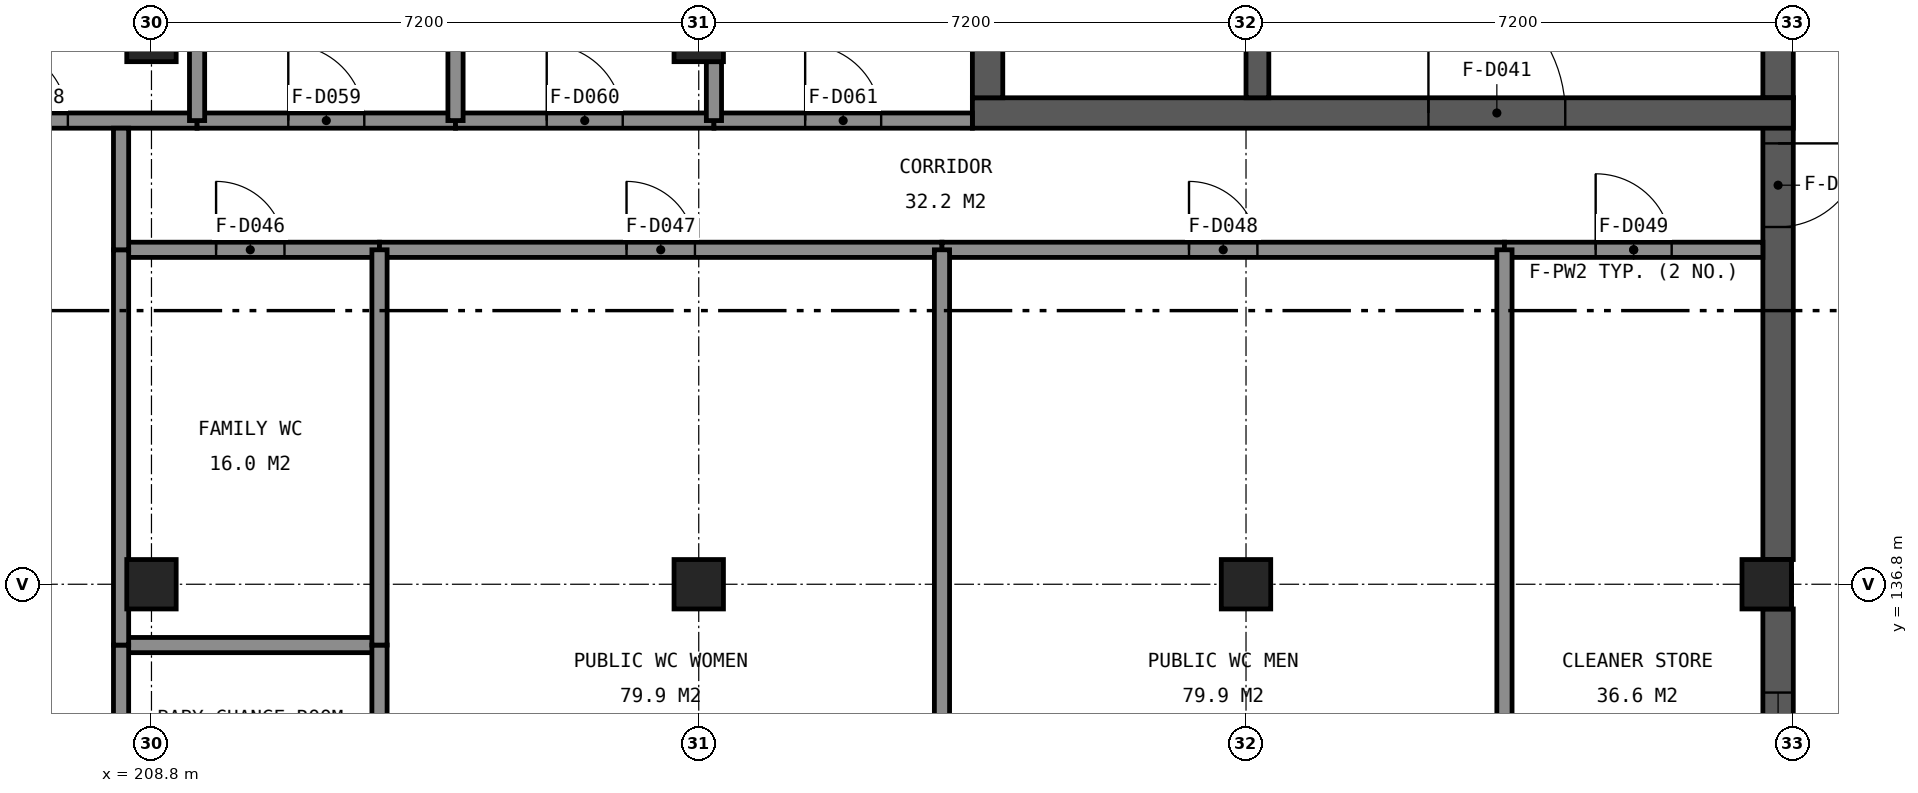
"""IFC4 building model, lengths in metres.
Left out: names, types, materials, properties, quantities, classifications, styles, units other than length and angle.
Written with IfcOpenShell. Run it as: python <this file> out.ifc"""

import sys

from ifc_helpers import new_model, si_unit, direction, frame, frame_2d, origin, origin_2d, place, context, subcontext, project, spatial, rectangle, extrude, element, fill, save


model = new_model("IFC4")
c1 = context("Model", 3, precision=1e-05, world=origin(), true_north=direction((0.0, 1.0)))
c2 = subcontext(c1, "Body", "Model", "MODEL_VIEW")
j1 = project(units=[si_unit("LENGTHUNIT", "METRE"), si_unit("PLANEANGLEUNIT", "RADIAN")], contexts=[c1])
p1 = place(None, origin())
s1 = spatial("IfcSite", under=j1, at=p1, CompositionType="ELEMENT")
p2 = place(p1, origin())
s2 = spatial("IfcBuilding", under=s1, at=p2, CompositionType="ELEMENT")
p3 = place(p2, frame((0.0, 0.0, 4.8)))
s3 = spatial("IfcBuildingStorey", under=s2, at=p3, CompositionType="ELEMENT", Elevation=4.8)
for number, where, z_axis, x_axis in (
    (1, (208.8, 136.8, 0.0), (0.0, 0.0, 1.0), (1.0, 0.0, 0.0)),
    (2, (216.0, 136.8, 0.0), (0.0, 0.0, 1.0), (1.0, 0.0, 0.0)),
    (3, (223.2, 136.8, 0.0), (0.0, 0.0, 1.0), (1.0, 0.0, 0.0)),
    (4, (230.05, 136.8, 0.0), (0.0, 0.0, 1.0), (1.0, 0.0, 0.0)),
    (5, (208.8, 144.0, 0.0), (0.0, 0.0, 1.0), (1.0, 0.0, 0.0)),
    (6, (216.0, 144.0, 0.0), (0.0, 0.0, 1.0), (1.0, 0.0, 0.0)),
):
    element("IfcColumn", number, at=place(p3, frame(where, z_axis=z_axis, x_axis=x_axis)), inside=s3, PredefinedType="COLUMN", context=c2, shape_type="SweptSolid", body=[
        extrude(rectangle(XDim=0.65, YDim=0.65, at=origin_2d()), origin(), (0.0, 0.0, 1.0), 4.8),
    ])
p4 = place(p3, frame((230.2, 136.475, 0.0), z_axis=(0.0, 0.0, 1.0), x_axis=(0.0, -1.0, 0.0)))
e7 = element("IfcWall", 7, at=p4, inside=s3, PredefinedType="SHEAR", context=c2, shape_type="SweptSolid", body=[
    extrude(rectangle(XDim=6.2, YDim=0.4, at=frame_2d((3.1, 0.0))), origin(), (0.0, 0.0, 1.0), 3.95),
])
p5 = place(p4, frame((1.1, 0.0, 1.0)))
e8 = element("IfcOpeningElement", 8, at=p5, cuts=e7, PredefinedType="OPENING", context=c2, shape_type="SweptSolid", body=[
    extrude(rectangle(XDim=1.4, YDim=1.8, at=frame_2d((0.7, 0.9))), frame((0.0, 0.21, 0.0), z_axis=(0.0, -1.0, 0.0), x_axis=(1.0, 0.0, 0.0)), (0.0, 0.0, 1.0), 0.42),
])
p6 = place(p4, frame((3.7, 0.0, 1.0)))
e9 = element("IfcOpeningElement", 9, at=p6, cuts=e7, PredefinedType="OPENING", context=c2, shape_type="SweptSolid", body=[
    extrude(rectangle(XDim=1.4, YDim=1.8, at=frame_2d((0.7, 0.9))), frame((0.0, 0.21, 0.0), z_axis=(0.0, -1.0, 0.0), x_axis=(1.0, 0.0, 0.0)), (0.0, 0.0, 1.0), 0.42),
])
p7 = place(p3, frame((230.2, 143.2, 0.0), z_axis=(0.0, 0.0, 1.0), x_axis=(0.0, -1.0, 0.0)))
e10 = element("IfcWall", 10, at=p7, inside=s3, PredefinedType="SHEAR", context=c2, shape_type="SweptSolid", body=[
    extrude(rectangle(XDim=6.075, YDim=0.4, at=frame_2d((3.038, 0.0))), origin(), (0.0, 0.0, 1.0), 3.95),
])
p8 = place(p7, frame((0.6, 0.0, 0.0)))
e11 = element("IfcOpeningElement", 11, at=p8, cuts=e10, PredefinedType="OPENING", context=c2, shape_type="SweptSolid", body=[
    extrude(rectangle(XDim=1.1, YDim=2.1, at=frame_2d((0.55, 1.05))), frame((0.0, 0.21, 0.0), z_axis=(0.0, -1.0, 0.0), x_axis=(1.0, 0.0, 0.0)), (0.0, 0.0, 1.0), 0.42),
])
p9 = place(p3, frame((230.2, 150.8, 0.0), z_axis=(0.0, 0.0, 1.0), x_axis=(0.0, -1.0, 0.0)))
e12 = element("IfcWall", 12, at=p9, inside=s3, PredefinedType="SHEAR", context=c2, shape_type="SweptSolid", body=[
    extrude(rectangle(XDim=7.6, YDim=0.4, at=frame_2d((3.8, 0.0))), origin(), (0.0, 0.0, 1.0), 4.55),
])
p10 = place(p3, frame((219.6, 143.0, 0.0), z_axis=(0.0, 0.0, 1.0), x_axis=(1.0, 0.0, 0.0)))
e13 = element("IfcWall", 13, at=p10, inside=s3, PredefinedType="SHEAR", context=c2, shape_type="SweptSolid", body=[
    extrude(rectangle(XDim=10.8, YDim=0.4, at=frame_2d((5.4, 0.0))), origin(), (0.0, 0.0, 1.0), 4.55),
])
p11 = place(p10, frame((6.0, 0.0, 0.0)))
e14 = element("IfcOpeningElement", 14, at=p11, cuts=e13, PredefinedType="OPENING", context=c2, shape_type="SweptSolid", body=[
    extrude(rectangle(XDim=1.8, YDim=2.1, at=frame_2d((0.9, 1.05))), frame((0.0, 0.21, 0.0), z_axis=(0.0, -1.0, 0.0), x_axis=(1.0, 0.0, 0.0)), (0.0, 0.0, 1.0), 0.42),
])
p12 = place(p3, frame((219.8, 143.2, 0.0), z_axis=(0.0, 0.0, 1.0), x_axis=(0.0, 1.0, 0.0)))
e15 = element("IfcWall", 15, at=p12, inside=s3, PredefinedType="SHEAR", context=c2, shape_type="SweptSolid", body=[
    extrude(rectangle(XDim=7.6, YDim=0.4, at=frame_2d((3.8, 0.0))), origin(), (0.0, 0.0, 1.0), 4.55),
])
p13 = place(p3, frame((223.35, 143.2, 0.0), z_axis=(0.0, 0.0, 1.0), x_axis=(0.0, 1.0, 0.0)))
e16 = element("IfcWall", 16, at=p13, inside=s3, PredefinedType="SHEAR", context=c2, shape_type="SweptSolid", body=[
    extrude(rectangle(XDim=7.6, YDim=0.3, at=frame_2d((3.8, 0.0))), origin(), (0.0, 0.0, 1.0), 4.55),
])
p14 = place(p13, frame((6.35, 0.0, 0.0)))
e17 = element("IfcOpeningElement", 17, at=p14, cuts=e16, PredefinedType="OPENING", context=c2, shape_type="SweptSolid", body=[
    extrude(rectangle(XDim=1.0, YDim=2.1, at=frame_2d((0.5, 1.05))), frame((0.0, 0.16, 0.0), z_axis=(0.0, -1.0, 0.0), x_axis=(1.0, 0.0, 0.0)), (0.0, 0.0, 1.0), 0.32),
])
p15 = place(p3, frame((208.4, 136.0, 0.0), z_axis=(0.0, 0.0, 1.0), x_axis=(1.0, 0.0, 0.0)))
e18 = element("IfcWall", 18, at=p15, inside=s3, PredefinedType="PARTITIONING", context=c2, shape_type="SweptSolid", body=[
    extrude(rectangle(XDim=3.4, YDim=0.2, at=frame_2d((1.7, 0.0))), origin(), (0.0, 0.0, 1.0), 3.95),
])
p16 = place(p3, frame((208.4, 141.2, 0.0), z_axis=(0.0, 0.0, 1.0), x_axis=(1.0, 0.0, 0.0)))
e19 = element("IfcWall", 19, at=p16, inside=s3, PredefinedType="PARTITIONING", context=c2, shape_type="SweptSolid", body=[
    extrude(rectangle(XDim=3.4, YDim=0.2, at=frame_2d((1.7, 0.0))), origin(), (0.0, 0.0, 1.0), 3.95),
])
p17 = place(p16, frame((1.25, 0.0, 0.0)))
e20 = element("IfcOpeningElement", 20, at=p17, cuts=e19, PredefinedType="OPENING", context=c2, shape_type="SweptSolid", body=[
    extrude(rectangle(XDim=0.9, YDim=2.1, at=frame_2d((0.45, 1.05))), frame((0.0, 0.11, 0.0), z_axis=(0.0, -1.0, 0.0), x_axis=(1.0, 0.0, 0.0)), (0.0, 0.0, 1.0), 0.22),
])
p18 = place(p3, frame((211.8, 141.2, 0.0), z_axis=(0.0, 0.0, 1.0), x_axis=(1.0, 0.0, 0.0)))
e21 = element("IfcWall", 21, at=p18, inside=s3, PredefinedType="PARTITIONING", context=c2, shape_type="SweptSolid", body=[
    extrude(rectangle(XDim=7.4, YDim=0.2, at=frame_2d((3.7, 0.0))), origin(), (0.0, 0.0, 1.0), 3.95),
])
p19 = place(p18, frame((3.25, 0.0, 0.0)))
e22 = element("IfcOpeningElement", 22, at=p19, cuts=e21, PredefinedType="OPENING", context=c2, shape_type="SweptSolid", body=[
    extrude(rectangle(XDim=0.9, YDim=2.1, at=frame_2d((0.45, 1.05))), frame((0.0, 0.11, 0.0), z_axis=(0.0, -1.0, 0.0), x_axis=(1.0, 0.0, 0.0)), (0.0, 0.0, 1.0), 0.22),
])
p20 = place(p3, frame((219.2, 141.2, 0.0), z_axis=(0.0, 0.0, 1.0), x_axis=(1.0, 0.0, 0.0)))
e23 = element("IfcWall", 23, at=p20, inside=s3, PredefinedType="PARTITIONING", context=c2, shape_type="SweptSolid", body=[
    extrude(rectangle(XDim=7.4, YDim=0.2, at=frame_2d((3.7, 0.0))), origin(), (0.0, 0.0, 1.0), 3.95),
])
p21 = place(p20, frame((3.25, 0.0, 0.0)))
e24 = element("IfcOpeningElement", 24, at=p21, cuts=e23, PredefinedType="OPENING", context=c2, shape_type="SweptSolid", body=[
    extrude(rectangle(XDim=0.9, YDim=2.1, at=frame_2d((0.45, 1.05))), frame((0.0, 0.11, 0.0), z_axis=(0.0, -1.0, 0.0), x_axis=(1.0, 0.0, 0.0)), (0.0, 0.0, 1.0), 0.22),
])
p22 = place(p3, frame((226.6, 141.2, 0.0), z_axis=(0.0, 0.0, 1.0), x_axis=(1.0, 0.0, 0.0)))
e25 = element("IfcWall", 25, at=p22, inside=s3, PredefinedType="PARTITIONING", context=c2, shape_type="SweptSolid", body=[
    extrude(rectangle(XDim=3.4, YDim=0.2, at=frame_2d((1.7, 0.0))), origin(), (0.0, 0.0, 1.0), 3.95),
])
p23 = place(p22, frame((1.2, 0.0, 0.0)))
e26 = element("IfcOpeningElement", 26, at=p23, cuts=e25, PredefinedType="OPENING", context=c2, shape_type="SweptSolid", body=[
    extrude(rectangle(XDim=1.0, YDim=2.1, at=frame_2d((0.5, 1.05))), frame((0.0, 0.11, 0.0), z_axis=(0.0, -1.0, 0.0), x_axis=(1.0, 0.0, 0.0)), (0.0, 0.0, 1.0), 0.22),
])
p24 = place(p3, frame((206.0, 142.9, 0.0), z_axis=(0.0, 0.0, 1.0), x_axis=(1.0, 0.0, 0.0)))
e27 = element("IfcWall", 27, at=p24, inside=s3, PredefinedType="PARTITIONING", context=c2, shape_type="SweptSolid", body=[
    extrude(rectangle(XDim=3.4, YDim=0.2, at=frame_2d((1.7, 0.0))), origin(), (0.0, 0.0, 1.0), 3.95),
])
p25 = place(p24, frame((0.7, 0.0, 0.0)))
e28 = element("IfcOpeningElement", 28, at=p25, cuts=e27, PredefinedType="OPENING", context=c2, shape_type="SweptSolid", body=[
    extrude(rectangle(XDim=1.0, YDim=2.1, at=frame_2d((0.5, 1.05))), frame((0.0, 0.11, 0.0), z_axis=(0.0, -1.0, 0.0), x_axis=(1.0, 0.0, 0.0)), (0.0, 0.0, 1.0), 0.22),
])
p26 = place(p3, frame((209.4, 142.9, 0.0), z_axis=(0.0, 0.0, 1.0), x_axis=(1.0, 0.0, 0.0)))
e29 = element("IfcWall", 29, at=p26, inside=s3, PredefinedType="PARTITIONING", context=c2, shape_type="SweptSolid", body=[
    extrude(rectangle(XDim=3.4, YDim=0.2, at=frame_2d((1.7, 0.0))), origin(), (0.0, 0.0, 1.0), 3.95),
])
p27 = place(p26, frame((1.2, 0.0, 0.0)))
e30 = element("IfcOpeningElement", 30, at=p27, cuts=e29, PredefinedType="OPENING", context=c2, shape_type="SweptSolid", body=[
    extrude(rectangle(XDim=1.0, YDim=2.1, at=frame_2d((0.5, 1.05))), frame((0.0, 0.11, 0.0), z_axis=(0.0, -1.0, 0.0), x_axis=(1.0, 0.0, 0.0)), (0.0, 0.0, 1.0), 0.22),
])
p28 = place(p3, frame((212.8, 142.9, 0.0), z_axis=(0.0, 0.0, 1.0), x_axis=(1.0, 0.0, 0.0)))
e31 = element("IfcWall", 31, at=p28, inside=s3, PredefinedType="PARTITIONING", context=c2, shape_type="SweptSolid", body=[
    extrude(rectangle(XDim=3.4, YDim=0.2, at=frame_2d((1.7, 0.0))), origin(), (0.0, 0.0, 1.0), 3.95),
])
p29 = place(p28, frame((1.2, 0.0, 0.0)))
e32 = element("IfcOpeningElement", 32, at=p29, cuts=e31, PredefinedType="OPENING", context=c2, shape_type="SweptSolid", body=[
    extrude(rectangle(XDim=1.0, YDim=2.1, at=frame_2d((0.5, 1.05))), frame((0.0, 0.11, 0.0), z_axis=(0.0, -1.0, 0.0), x_axis=(1.0, 0.0, 0.0)), (0.0, 0.0, 1.0), 0.22),
])
p30 = place(p3, frame((216.2, 142.9, 0.0), z_axis=(0.0, 0.0, 1.0), x_axis=(1.0, 0.0, 0.0)))
e33 = element("IfcWall", 33, at=p30, inside=s3, PredefinedType="PARTITIONING", context=c2, shape_type="SweptSolid", body=[
    extrude(rectangle(XDim=3.4, YDim=0.2, at=frame_2d((1.7, 0.0))), origin(), (0.0, 0.0, 1.0), 3.95),
])
p31 = place(p30, frame((1.2, 0.0, 0.0)))
e34 = element("IfcOpeningElement", 34, at=p31, cuts=e33, PredefinedType="OPENING", context=c2, shape_type="SweptSolid", body=[
    extrude(rectangle(XDim=1.0, YDim=2.1, at=frame_2d((0.5, 1.05))), frame((0.0, 0.11, 0.0), z_axis=(0.0, -1.0, 0.0), x_axis=(1.0, 0.0, 0.0)), (0.0, 0.0, 1.0), 0.22),
])
p32 = place(p3, frame((208.4, 133.0, 0.0), z_axis=(0.0, 0.0, 1.0), x_axis=(0.0, 1.0, 0.0)))
e35 = element("IfcWall", 35, at=p32, inside=s3, PredefinedType="PARTITIONING", context=c2, shape_type="SweptSolid", body=[
    extrude(rectangle(XDim=3.0, YDim=0.2, at=frame_2d((1.5, 0.0))), origin(), (0.0, 0.0, 1.0), 3.95),
])
p33 = place(p32, frame((1.05, 0.0, 0.0)))
e36 = element("IfcOpeningElement", 36, at=p33, cuts=e35, PredefinedType="OPENING", context=c2, shape_type="SweptSolid", body=[
    extrude(rectangle(XDim=0.9, YDim=2.1, at=frame_2d((0.45, 1.05))), frame((0.0, 0.11, 0.0), z_axis=(0.0, -1.0, 0.0), x_axis=(1.0, 0.0, 0.0)), (0.0, 0.0, 1.0), 0.22),
])
p34 = place(p3, frame((208.4, 136.0, 0.0), z_axis=(0.0, 0.0, 1.0), x_axis=(0.0, 1.0, 0.0)))
e37 = element("IfcWall", 37, at=p34, inside=s3, PredefinedType="PARTITIONING", context=c2, shape_type="SweptSolid", body=[
    extrude(rectangle(XDim=5.2, YDim=0.2, at=frame_2d((2.6, 0.0))), origin(), (0.0, 0.0, 1.0), 3.95),
])
p35 = place(p3, frame((208.4, 141.2, 0.0), z_axis=(0.0, 0.0, 1.0), x_axis=(0.0, 1.0, 0.0)))
e38 = element("IfcWall", 38, at=p35, inside=s3, PredefinedType="PARTITIONING", context=c2, shape_type="SweptSolid", body=[
    extrude(rectangle(XDim=1.6, YDim=0.2, at=frame_2d((0.8, 0.0))), origin(), (0.0, 0.0, 1.0), 3.95),
])
p36 = place(p3, frame((209.4, 142.9, 0.0), z_axis=(0.0, 0.0, 1.0), x_axis=(0.0, 1.0, 0.0)))
e39 = element("IfcWall", 39, at=p36, inside=s3, PredefinedType="PARTITIONING", context=c2, shape_type="SweptSolid", body=[
    extrude(rectangle(XDim=7.9, YDim=0.2, at=frame_2d((3.95, 0.0))), origin(), (0.0, 0.0, 1.0), 3.95),
])
p37 = place(p3, frame((211.8, 133.0, 0.0), z_axis=(0.0, 0.0, 1.0), x_axis=(0.0, 1.0, 0.0)))
e40 = element("IfcWall", 40, at=p37, inside=s3, PredefinedType="PARTITIONING", context=c2, shape_type="SweptSolid", body=[
    extrude(rectangle(XDim=3.0, YDim=0.2, at=frame_2d((1.5, 0.0))), origin(), (0.0, 0.0, 1.0), 3.95),
])
p38 = place(p3, frame((211.8, 136.0, 0.0), z_axis=(0.0, 0.0, 1.0), x_axis=(0.0, 1.0, 0.0)))
e41 = element("IfcWall", 41, at=p38, inside=s3, PredefinedType="PARTITIONING", context=c2, shape_type="SweptSolid", body=[
    extrude(rectangle(XDim=5.2, YDim=0.2, at=frame_2d((2.6, 0.0))), origin(), (0.0, 0.0, 1.0), 3.95),
])
p39 = place(p3, frame((212.8, 142.9, 0.0), z_axis=(0.0, 0.0, 1.0), x_axis=(0.0, 1.0, 0.0)))
e42 = element("IfcWall", 42, at=p39, inside=s3, PredefinedType="PARTITIONING", context=c2, shape_type="SweptSolid", body=[
    extrude(rectangle(XDim=7.9, YDim=0.2, at=frame_2d((3.95, 0.0))), origin(), (0.0, 0.0, 1.0), 3.95),
])
p40 = place(p3, frame((216.2, 142.9, 0.0), z_axis=(0.0, 0.0, 1.0), x_axis=(0.0, 1.0, 0.0)))
e43 = element("IfcWall", 43, at=p40, inside=s3, PredefinedType="PARTITIONING", context=c2, shape_type="SweptSolid", body=[
    extrude(rectangle(XDim=0.775, YDim=0.2, at=frame_2d((0.388, 0.0))), origin(), (0.0, 0.0, 1.0), 3.95),
])
for number, where, z_axis, x_axis in (
    (44, (219.2, 130.0, 0.0), (0.0, 0.0, 1.0), (0.0, 1.0, 0.0)),
    (45, (226.6, 130.0, 0.0), (0.0, 0.0, 1.0), (0.0, 1.0, 0.0)),
):
    element("IfcWall", number, at=place(p3, frame(where, z_axis=z_axis, x_axis=x_axis)), inside=s3, PredefinedType="PARTITIONING", context=c2, shape_type="SweptSolid", body=[
        extrude(rectangle(XDim=11.2, YDim=0.2, at=frame_2d((5.6, 0.0))), origin(), (0.0, 0.0, 1.0), 3.95),
    ])
p41 = place(p5, origin())
e46 = element("IfcWindow", 46, at=p41, inside=s3, PartitioningType="SINGLE_PANEL", PredefinedType="WINDOW", context=c2, shape_type="SweptSolid", body=[
    extrude(rectangle(XDim=1.4, YDim=1.8, at=frame_2d((0.7, 0.9))), frame((0.0, -0.09, 0.0), z_axis=(0.0, -1.0, 0.0), x_axis=(1.0, 0.0, 0.0)), (0.0, 0.0, 1.0), 0.06),
])
fill(e8, e46)
p42 = place(p8, origin())
e47 = element("IfcDoor", 47, at=p42, inside=s3, OperationType="NOTDEFINED", PredefinedType="DOOR", context=c2, shape_type="SweptSolid", body=[
    extrude(rectangle(XDim=1.1, YDim=2.1, at=frame_2d((0.55, 1.05))), frame((0.0, 0.025, 0.0), z_axis=(0.0, -1.0, 0.0), x_axis=(1.0, 0.0, 0.0)), (0.0, 0.0, 1.0), 0.05),
])
fill(e11, e47)
p43 = place(p11, origin())
e48 = element("IfcDoor", 48, at=p43, inside=s3, OperationType="NOTDEFINED", PredefinedType="DOOR", context=c2, shape_type="SweptSolid", body=[
    extrude(rectangle(XDim=1.8, YDim=2.1, at=frame_2d((0.9, 1.05))), frame((0.0, 0.025, 0.0), z_axis=(0.0, -1.0, 0.0), x_axis=(1.0, 0.0, 0.0)), (0.0, 0.0, 1.0), 0.05),
])
fill(e14, e48)
p44 = place(p17, origin())
e49 = element("IfcDoor", 49, at=p44, inside=s3, OperationType="NOTDEFINED", PredefinedType="DOOR", context=c2, shape_type="SweptSolid", body=[
    extrude(rectangle(XDim=0.9, YDim=2.1, at=frame_2d((0.45, 1.05))), frame((0.0, 0.025, 0.0), z_axis=(0.0, -1.0, 0.0), x_axis=(1.0, 0.0, 0.0)), (0.0, 0.0, 1.0), 0.05),
])
fill(e20, e49)
p45 = place(p19, origin())
e50 = element("IfcDoor", 50, at=p45, inside=s3, OperationType="NOTDEFINED", PredefinedType="DOOR", context=c2, shape_type="SweptSolid", body=[
    extrude(rectangle(XDim=0.9, YDim=2.1, at=frame_2d((0.45, 1.05))), frame((0.0, 0.025, 0.0), z_axis=(0.0, -1.0, 0.0), x_axis=(1.0, 0.0, 0.0)), (0.0, 0.0, 1.0), 0.05),
])
fill(e22, e50)
p46 = place(p21, origin())
e51 = element("IfcDoor", 51, at=p46, inside=s3, OperationType="NOTDEFINED", PredefinedType="DOOR", context=c2, shape_type="SweptSolid", body=[
    extrude(rectangle(XDim=0.9, YDim=2.1, at=frame_2d((0.45, 1.05))), frame((0.0, 0.025, 0.0), z_axis=(0.0, -1.0, 0.0), x_axis=(1.0, 0.0, 0.0)), (0.0, 0.0, 1.0), 0.05),
])
fill(e24, e51)
p47 = place(p23, origin())
e52 = element("IfcDoor", 52, at=p47, inside=s3, OperationType="NOTDEFINED", PredefinedType="DOOR", context=c2, shape_type="SweptSolid", body=[
    extrude(rectangle(XDim=1.0, YDim=2.1, at=frame_2d((0.5, 1.05))), frame((0.0, 0.025, 0.0), z_axis=(0.0, -1.0, 0.0), x_axis=(1.0, 0.0, 0.0)), (0.0, 0.0, 1.0), 0.05),
])
fill(e26, e52)
p48 = place(p25, origin())
e53 = element("IfcDoor", 53, at=p48, inside=s3, OperationType="NOTDEFINED", PredefinedType="DOOR", context=c2, shape_type="SweptSolid", body=[
    extrude(rectangle(XDim=1.0, YDim=2.1, at=frame_2d((0.5, 1.05))), frame((0.0, 0.025, 0.0), z_axis=(0.0, -1.0, 0.0), x_axis=(1.0, 0.0, 0.0)), (0.0, 0.0, 1.0), 0.05),
])
fill(e28, e53)
p49 = place(p27, origin())
e54 = element("IfcDoor", 54, at=p49, inside=s3, OperationType="NOTDEFINED", PredefinedType="DOOR", context=c2, shape_type="SweptSolid", body=[
    extrude(rectangle(XDim=1.0, YDim=2.1, at=frame_2d((0.5, 1.05))), frame((0.0, 0.025, 0.0), z_axis=(0.0, -1.0, 0.0), x_axis=(1.0, 0.0, 0.0)), (0.0, 0.0, 1.0), 0.05),
])
fill(e30, e54)
p50 = place(p29, origin())
e55 = element("IfcDoor", 55, at=p50, inside=s3, OperationType="NOTDEFINED", PredefinedType="DOOR", context=c2, shape_type="SweptSolid", body=[
    extrude(rectangle(XDim=1.0, YDim=2.1, at=frame_2d((0.5, 1.05))), frame((0.0, 0.025, 0.0), z_axis=(0.0, -1.0, 0.0), x_axis=(1.0, 0.0, 0.0)), (0.0, 0.0, 1.0), 0.05),
])
fill(e32, e55)
p51 = place(p31, origin())
e56 = element("IfcDoor", 56, at=p51, inside=s3, OperationType="NOTDEFINED", PredefinedType="DOOR", context=c2, shape_type="SweptSolid", body=[
    extrude(rectangle(XDim=1.0, YDim=2.1, at=frame_2d((0.5, 1.05))), frame((0.0, 0.025, 0.0), z_axis=(0.0, -1.0, 0.0), x_axis=(1.0, 0.0, 0.0)), (0.0, 0.0, 1.0), 0.05),
])
fill(e34, e56)
save(model, sys.argv[1])
